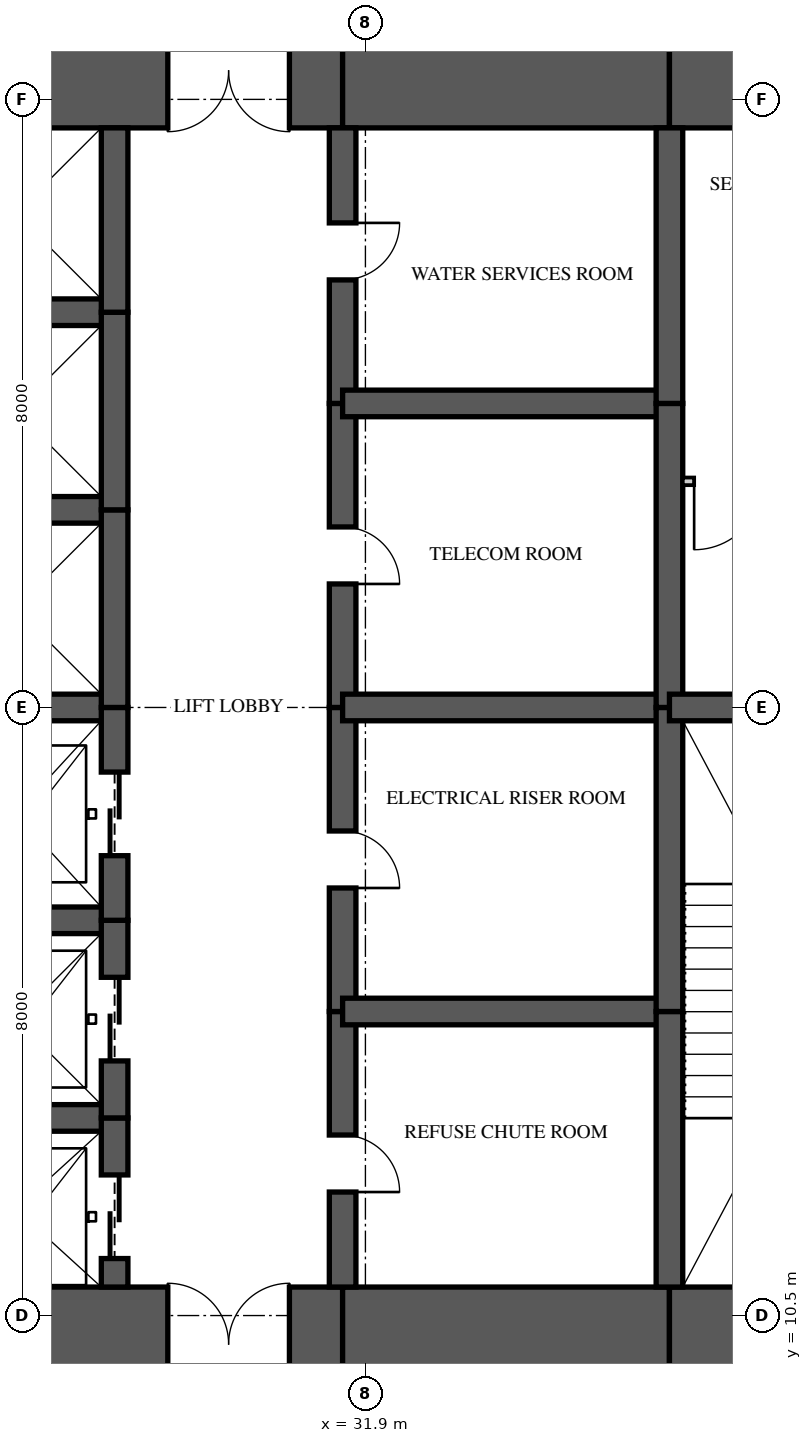
"""IFC4 building model, lengths in metres.
Left out: names, types, materials, properties, quantities, classifications, styles, units other than length and angle.
Written with IfcOpenShell. Run it as: python <this file> out.ifc"""

import sys

from ifc_helpers import new_model, si_unit, direction, frame, frame_2d, origin, place, context, subcontext, project, spatial, rectangle, extrude, element, fill, save


model = new_model("IFC4")
c1 = context("Model", 3, precision=1e-05, world=origin(), true_north=direction((0.0, 1.0)))
c2 = subcontext(c1, "Body", "Model", "MODEL_VIEW")
j1 = project(units=[si_unit("LENGTHUNIT", "METRE"), si_unit("PLANEANGLEUNIT", "RADIAN")], contexts=[c1])
p1 = place(None, origin())
s1 = spatial("IfcSite", under=j1, at=p1, CompositionType="ELEMENT")
p2 = place(p1, origin())
s2 = spatial("IfcBuilding", under=s1, at=p2, CompositionType="ELEMENT")
p3 = place(p2, frame((0.0, 0.0, 114.9)))
s3 = spatial("IfcBuildingStorey", under=s2, at=p3, CompositionType="ELEMENT", Elevation=114.9)
p4 = place(p3, frame((26.0, 10.125, 0.0), z_axis=(0.0, 0.0, 1.0), x_axis=(1.0, 0.0, 0.0)))
e1 = element("IfcWall", 1, at=p4, inside=s3, PredefinedType="SHEAR", context=c2, shape_type="SweptSolid", body=[
    extrude(rectangle(XDim=5.6, YDim=1.5, at=frame_2d((2.8, 0.0))), origin(), (0.0, 0.0, 1.0), 3.35),
])
p5 = place(p4, frame((3.3, 0.0, 0.0)))
e2 = element("IfcOpeningElement", 2, at=p5, cuts=e1, PredefinedType="OPENING", context=c2, shape_type="SweptSolid", body=[
    extrude(rectangle(XDim=1.6, YDim=2.1, at=frame_2d((0.8, 1.05))), frame((0.0, 0.76, 0.0), z_axis=(0.0, -1.0, 0.0), x_axis=(1.0, 0.0, 0.0)), (0.0, 0.0, 1.0), 1.52),
])
p6 = place(p3, frame((31.6, 10.125, 0.0), z_axis=(0.0, 0.0, 1.0), x_axis=(1.0, 0.0, 0.0)))
e3 = element("IfcWall", 3, at=p6, inside=s3, PredefinedType="SHEAR", context=c2, shape_type="SweptSolid", body=[
    extrude(rectangle(XDim=4.3, YDim=1.5, at=frame_2d((2.15, 0.0))), origin(), (0.0, 0.0, 1.0), 3.35),
])
p7 = place(p3, frame((35.9, 10.125, 0.0), z_axis=(0.0, 0.0, 1.0), x_axis=(1.0, 0.0, 0.0)))
e4 = element("IfcWall", 4, at=p7, inside=s3, PredefinedType="SHEAR", context=c2, shape_type="SweptSolid", body=[
    extrude(rectangle(XDim=8.325, YDim=1.5, at=frame_2d((4.163, 0.0))), origin(), (0.0, 0.0, 1.0), 3.35),
])
p8 = place(p7, frame((2.7, 0.0, 0.0)))
e5 = element("IfcOpeningElement", 5, at=p8, cuts=e4, PredefinedType="OPENING", context=c2, shape_type="SweptSolid", body=[
    extrude(rectangle(XDim=1.0, YDim=2.1, at=frame_2d((0.5, 1.05))), frame((0.0, 0.76, 0.0), z_axis=(0.0, -1.0, 0.0), x_axis=(1.0, 0.0, 0.0)), (0.0, 0.0, 1.0), 1.52),
])
p9 = place(p3, frame((44.225, 26.875, 0.0), z_axis=(0.0, 0.0, 1.0), x_axis=(-1.0, 0.0, 0.0)))
e6 = element("IfcWall", 6, at=p9, inside=s3, PredefinedType="SHEAR", context=c2, shape_type="SweptSolid", body=[
    extrude(rectangle(XDim=8.325, YDim=1.5, at=frame_2d((4.163, 0.0))), origin(), (0.0, 0.0, 1.0), 3.35),
])
p10 = place(p9, frame((5.725, 0.0, 0.0)))
e7 = element("IfcOpeningElement", 7, at=p10, cuts=e6, PredefinedType="OPENING", context=c2, shape_type="SweptSolid", body=[
    extrude(rectangle(XDim=0.9, YDim=2.1, at=frame_2d((0.45, 1.05))), frame((0.0, 0.76, 0.0), z_axis=(0.0, -1.0, 0.0), x_axis=(1.0, 0.0, 0.0)), (0.0, 0.0, 1.0), 1.52),
])
p11 = place(p3, frame((35.9, 26.875, 0.0), z_axis=(0.0, 0.0, 1.0), x_axis=(-1.0, 0.0, 0.0)))
e8 = element("IfcWall", 8, at=p11, inside=s3, PredefinedType="SHEAR", context=c2, shape_type="SweptSolid", body=[
    extrude(rectangle(XDim=4.3, YDim=1.5, at=frame_2d((2.15, 0.0))), origin(), (0.0, 0.0, 1.0), 3.35),
])
p12 = place(p3, frame((31.6, 26.875, 0.0), z_axis=(0.0, 0.0, 1.0), x_axis=(-1.0, 0.0, 0.0)))
e9 = element("IfcWall", 9, at=p12, inside=s3, PredefinedType="SHEAR", context=c2, shape_type="SweptSolid", body=[
    extrude(rectangle(XDim=5.6, YDim=1.5, at=frame_2d((2.8, 0.0))), origin(), (0.0, 0.0, 1.0), 3.35),
])
p13 = place(p12, frame((0.7, 0.0, 0.0)))
e10 = element("IfcOpeningElement", 10, at=p13, cuts=e9, PredefinedType="OPENING", context=c2, shape_type="SweptSolid", body=[
    extrude(rectangle(XDim=1.6, YDim=2.1, at=frame_2d((0.8, 1.05))), frame((0.0, 0.76, 0.0), z_axis=(0.0, -1.0, 0.0), x_axis=(1.0, 0.0, 0.0)), (0.0, 0.0, 1.0), 1.52),
])
p14 = place(p3, frame((28.6, 10.875, 0.0), z_axis=(0.0, 0.0, 1.0), x_axis=(0.0, 1.0, 0.0)))
e11 = element("IfcWall", 11, at=p14, inside=s3, PredefinedType="SHEAR", context=c2, shape_type="SweptSolid", body=[
    extrude(rectangle(XDim=2.225, YDim=0.35, at=frame_2d((1.113, 0.0))), origin(), (0.0, 0.0, 1.0), 3.35),
])
p15 = place(p14, frame((0.375, 0.0, 0.0)))
e12 = element("IfcOpeningElement", 12, at=p15, cuts=e11, PredefinedType="OPENING", context=c2, shape_type="SweptSolid", body=[
    extrude(rectangle(XDim=1.1, YDim=2.1, at=frame_2d((0.55, 1.05))), frame((0.0, 0.185, 0.0), z_axis=(0.0, -1.0, 0.0), x_axis=(1.0, 0.0, 0.0)), (0.0, 0.0, 1.0), 0.37),
])
p16 = place(p3, frame((28.6, 13.1, 0.0), z_axis=(0.0, 0.0, 1.0), x_axis=(0.0, 1.0, 0.0)))
e13 = element("IfcWall", 13, at=p16, inside=s3, PredefinedType="SHEAR", context=c2, shape_type="SweptSolid", body=[
    extrude(rectangle(XDim=2.6, YDim=0.35, at=frame_2d((1.3, 0.0))), origin(), (0.0, 0.0, 1.0), 3.35),
])
p17 = place(p16, frame((0.75, 0.0, 0.0)))
e14 = element("IfcOpeningElement", 14, at=p17, cuts=e13, PredefinedType="OPENING", context=c2, shape_type="SweptSolid", body=[
    extrude(rectangle(XDim=1.1, YDim=2.1, at=frame_2d((0.55, 1.05))), frame((0.0, 0.185, 0.0), z_axis=(0.0, -1.0, 0.0), x_axis=(1.0, 0.0, 0.0)), (0.0, 0.0, 1.0), 0.37),
])
p18 = place(p3, frame((28.6, 15.7, 0.0), z_axis=(0.0, 0.0, 1.0), x_axis=(0.0, 1.0, 0.0)))
e15 = element("IfcWall", 15, at=p18, inside=s3, PredefinedType="SHEAR", context=c2, shape_type="SweptSolid", body=[
    extrude(rectangle(XDim=2.8, YDim=0.35, at=frame_2d((1.4, 0.0))), origin(), (0.0, 0.0, 1.0), 3.35),
])
p19 = place(p18, frame((0.85, 0.0, 0.0)))
e16 = element("IfcOpeningElement", 16, at=p19, cuts=e15, PredefinedType="OPENING", context=c2, shape_type="SweptSolid", body=[
    extrude(rectangle(XDim=1.1, YDim=2.1, at=frame_2d((0.55, 1.05))), frame((0.0, 0.185, 0.0), z_axis=(0.0, -1.0, 0.0), x_axis=(1.0, 0.0, 0.0)), (0.0, 0.0, 1.0), 0.37),
])
p20 = place(p3, frame((28.6, 18.5, 0.0), z_axis=(0.0, 0.0, 1.0), x_axis=(0.0, 1.0, 0.0)))
e17 = element("IfcWall", 17, at=p20, inside=s3, PredefinedType="SHEAR", context=c2, shape_type="SweptSolid", body=[
    extrude(rectangle(XDim=2.6, YDim=0.35, at=frame_2d((1.3, 0.0))), origin(), (0.0, 0.0, 1.0), 3.35),
])
p21 = place(p3, frame((28.6, 21.1, 0.0), z_axis=(0.0, 0.0, 1.0), x_axis=(0.0, 1.0, 0.0)))
e18 = element("IfcWall", 18, at=p21, inside=s3, PredefinedType="SHEAR", context=c2, shape_type="SweptSolid", body=[
    extrude(rectangle(XDim=2.6, YDim=0.35, at=frame_2d((1.3, 0.0))), origin(), (0.0, 0.0, 1.0), 3.35),
])
p22 = place(p3, frame((28.6, 23.7, 0.0), z_axis=(0.0, 0.0, 1.0), x_axis=(0.0, 1.0, 0.0)))
e19 = element("IfcWall", 19, at=p22, inside=s3, PredefinedType="SHEAR", context=c2, shape_type="SweptSolid", body=[
    extrude(rectangle(XDim=2.425, YDim=0.35, at=frame_2d((1.212, 0.0))), origin(), (0.0, 0.0, 1.0), 3.35),
])
p23 = place(p3, frame((31.6, 10.875, 0.0), z_axis=(0.0, 0.0, 1.0), x_axis=(0.0, 1.0, 0.0)))
e20 = element("IfcWall", 20, at=p23, inside=s3, PredefinedType="SHEAR", context=c2, shape_type="SweptSolid", body=[
    extrude(rectangle(XDim=3.625, YDim=0.35, at=frame_2d((1.812, 0.0))), origin(), (0.0, 0.0, 1.0), 3.35),
])
p24 = place(p23, frame((1.25, 0.0, 0.0)))
e21 = element("IfcOpeningElement", 21, at=p24, cuts=e20, PredefinedType="OPENING", context=c2, shape_type="SweptSolid", body=[
    extrude(rectangle(XDim=0.75, YDim=2.1, at=frame_2d((0.375, 1.05))), frame((0.0, 0.185, 0.0), z_axis=(0.0, -1.0, 0.0), x_axis=(1.0, 0.0, 0.0)), (0.0, 0.0, 1.0), 0.37),
])
p25 = place(p3, frame((31.6, 14.5, 0.0), z_axis=(0.0, 0.0, 1.0), x_axis=(0.0, 1.0, 0.0)))
e22 = element("IfcWall", 22, at=p25, inside=s3, PredefinedType="SHEAR", context=c2, shape_type="SweptSolid", body=[
    extrude(rectangle(XDim=4.0, YDim=0.35, at=frame_2d((2.0, 0.0))), origin(), (0.0, 0.0, 1.0), 3.35),
])
p26 = place(p25, frame((1.625, 0.0, 0.0)))
e23 = element("IfcOpeningElement", 23, at=p26, cuts=e22, PredefinedType="OPENING", context=c2, shape_type="SweptSolid", body=[
    extrude(rectangle(XDim=0.75, YDim=2.1, at=frame_2d((0.375, 1.05))), frame((0.0, 0.185, 0.0), z_axis=(0.0, -1.0, 0.0), x_axis=(1.0, 0.0, 0.0)), (0.0, 0.0, 1.0), 0.37),
])
p27 = place(p3, frame((31.6, 18.5, 0.0), z_axis=(0.0, 0.0, 1.0), x_axis=(0.0, 1.0, 0.0)))
e24 = element("IfcWall", 24, at=p27, inside=s3, PredefinedType="SHEAR", context=c2, shape_type="SweptSolid", body=[
    extrude(rectangle(XDim=4.0, YDim=0.35, at=frame_2d((2.0, 0.0))), origin(), (0.0, 0.0, 1.0), 3.35),
])
p28 = place(p27, frame((1.625, 0.0, 0.0)))
e25 = element("IfcOpeningElement", 25, at=p28, cuts=e24, PredefinedType="OPENING", context=c2, shape_type="SweptSolid", body=[
    extrude(rectangle(XDim=0.75, YDim=2.1, at=frame_2d((0.375, 1.05))), frame((0.0, 0.185, 0.0), z_axis=(0.0, -1.0, 0.0), x_axis=(1.0, 0.0, 0.0)), (0.0, 0.0, 1.0), 0.37),
])
p29 = place(p3, frame((31.6, 22.5, 0.0), z_axis=(0.0, 0.0, 1.0), x_axis=(0.0, 1.0, 0.0)))
e26 = element("IfcWall", 26, at=p29, inside=s3, PredefinedType="SHEAR", context=c2, shape_type="SweptSolid", body=[
    extrude(rectangle(XDim=3.625, YDim=0.35, at=frame_2d((1.812, 0.0))), origin(), (0.0, 0.0, 1.0), 3.35),
])
p30 = place(p29, frame((1.625, 0.0, 0.0)))
e27 = element("IfcOpeningElement", 27, at=p30, cuts=e26, PredefinedType="OPENING", context=c2, shape_type="SweptSolid", body=[
    extrude(rectangle(XDim=0.75, YDim=2.1, at=frame_2d((0.375, 1.05))), frame((0.0, 0.185, 0.0), z_axis=(0.0, -1.0, 0.0), x_axis=(1.0, 0.0, 0.0)), (0.0, 0.0, 1.0), 0.37),
])
p31 = place(p3, frame((35.9, 10.875, 0.0), z_axis=(0.0, 0.0, 1.0), x_axis=(0.0, 1.0, 0.0)))
e28 = element("IfcWall", 28, at=p31, inside=s3, PredefinedType="SHEAR", context=c2, shape_type="SweptSolid", body=[
    extrude(rectangle(XDim=3.625, YDim=0.35, at=frame_2d((1.812, 0.0))), origin(), (0.0, 0.0, 1.0), 3.35),
])
for number, where, z_axis, x_axis in (
    (29, (35.9, 14.5, 0.0), (0.0, 0.0, 1.0), (0.0, 1.0, 0.0)),
    (30, (35.9, 18.5, 0.0), (0.0, 0.0, 1.0), (0.0, 1.0, 0.0)),
):
    element("IfcWall", number, at=place(p3, frame(where, z_axis=z_axis, x_axis=x_axis)), inside=s3, PredefinedType="SHEAR", context=c2, shape_type="SweptSolid", body=[
        extrude(rectangle(XDim=4.0, YDim=0.35, at=frame_2d((2.0, 0.0))), origin(), (0.0, 0.0, 1.0), 3.35),
    ])
p32 = place(p3, frame((35.9, 22.5, 0.0), z_axis=(0.0, 0.0, 1.0), x_axis=(0.0, 1.0, 0.0)))
e31 = element("IfcWall", 31, at=p32, inside=s3, PredefinedType="SHEAR", context=c2, shape_type="SweptSolid", body=[
    extrude(rectangle(XDim=3.625, YDim=0.35, at=frame_2d((1.812, 0.0))), origin(), (0.0, 0.0, 1.0), 3.35),
])
for number, where, z_axis, x_axis in (
    (32, (26.0, 13.1, 0.0), (0.0, 0.0, 1.0), (1.0, 0.0, 0.0)),
    (33, (26.0, 15.7, 0.0), (0.0, 0.0, 1.0), (1.0, 0.0, 0.0)),
    (34, (26.0, 18.5, 0.0), (0.0, 0.0, 1.0), (1.0, 0.0, 0.0)),
    (35, (26.0, 21.1, 0.0), (0.0, 0.0, 1.0), (1.0, 0.0, 0.0)),
    (36, (26.0, 23.7, 0.0), (0.0, 0.0, 1.0), (1.0, 0.0, 0.0)),
):
    element("IfcWall", number, at=place(p3, frame(where, z_axis=z_axis, x_axis=x_axis)), inside=s3, PredefinedType="SHEAR", context=c2, shape_type="SweptSolid", body=[
        extrude(rectangle(XDim=2.6, YDim=0.35, at=frame_2d((1.3, 0.0))), origin(), (0.0, 0.0, 1.0), 3.35),
    ])
for number, where, z_axis, x_axis in (
    (37, (31.6, 14.5, 0.0), (0.0, 0.0, 1.0), (1.0, 0.0, 0.0)),
    (38, (31.6, 18.5, 0.0), (0.0, 0.0, 1.0), (1.0, 0.0, 0.0)),
    (39, (31.6, 22.5, 0.0), (0.0, 0.0, 1.0), (1.0, 0.0, 0.0)),
):
    element("IfcWall", number, at=place(p3, frame(where, z_axis=z_axis, x_axis=x_axis)), inside=s3, PredefinedType="SHEAR", context=c2, shape_type="SweptSolid", body=[
        extrude(rectangle(XDim=4.3, YDim=0.35, at=frame_2d((2.15, 0.0))), origin(), (0.0, 0.0, 1.0), 3.35),
    ])
p33 = place(p3, frame((35.9, 18.5, 0.0), z_axis=(0.0, 0.0, 1.0), x_axis=(1.0, 0.0, 0.0)))
e40 = element("IfcWall", 40, at=p33, inside=s3, PredefinedType="SHEAR", context=c2, shape_type="SweptSolid", body=[
    extrude(rectangle(XDim=4.3, YDim=0.35, at=frame_2d((2.15, 0.0))), origin(), (0.0, 0.0, 1.0), 3.35),
])
p34 = place(p3, frame((36.075, 21.475, 0.0), z_axis=(0.0, 0.0, 1.0), x_axis=(1.0, 0.0, 0.0)))
e41 = element("IfcWall", 41, at=p34, inside=s3, PredefinedType="PARTITIONING", context=c2, shape_type="SweptSolid", body=[
    extrude(rectangle(XDim=3.95, YDim=0.1, at=frame_2d((1.975, 0.0))), origin(), (0.0, 0.0, 1.0), 3.11),
])
p35 = place(p34, frame((0.15, 0.0, 0.0)))
e42 = element("IfcOpeningElement", 42, at=p35, cuts=e41, PredefinedType="OPENING", context=c2, shape_type="SweptSolid", body=[
    extrude(rectangle(XDim=0.9, YDim=2.1, at=frame_2d((0.45, 1.05))), frame((0.0, 0.06, 0.0), z_axis=(0.0, -1.0, 0.0), x_axis=(1.0, 0.0, 0.0)), (0.0, 0.0, 1.0), 0.12),
])
p36 = place(p35, frame((0.9, 0.0, 0.0), z_axis=(0.0, 0.0, 1.0), x_axis=(-1.0, 0.0, 0.0)))
e43 = element("IfcDoor", 43, at=p36, inside=s3, OperationType="SINGLE_SWING_RIGHT", PredefinedType="DOOR", context=c2, shape_type="SweptSolid", body=[
    extrude(rectangle(XDim=0.9, YDim=2.1, at=frame_2d((0.45, 1.05))), frame((0.0, 0.025, 0.0), z_axis=(0.0, -1.0, 0.0), x_axis=(1.0, 0.0, 0.0)), (0.0, 0.0, 1.0), 0.05),
])
fill(e42, e43)
p37 = place(p15, origin())
e44 = element("IfcDoor", 44, at=p37, inside=s3, OperationType="SLIDING_TO_LEFT", PredefinedType="DOOR", context=c2, shape_type="SweptSolid", body=[
    extrude(rectangle(XDim=1.1, YDim=2.1, at=frame_2d((0.55, 1.05))), frame((0.0, 0.025, 0.0), z_axis=(0.0, -1.0, 0.0), x_axis=(1.0, 0.0, 0.0)), (0.0, 0.0, 1.0), 0.05),
])
fill(e12, e44)
p38 = place(p17, origin())
e45 = element("IfcDoor", 45, at=p38, inside=s3, OperationType="SLIDING_TO_LEFT", PredefinedType="DOOR", context=c2, shape_type="SweptSolid", body=[
    extrude(rectangle(XDim=1.1, YDim=2.1, at=frame_2d((0.55, 1.05))), frame((0.0, 0.025, 0.0), z_axis=(0.0, -1.0, 0.0), x_axis=(1.0, 0.0, 0.0)), (0.0, 0.0, 1.0), 0.05),
])
fill(e14, e45)
p39 = place(p19, origin())
e46 = element("IfcDoor", 46, at=p39, inside=s3, OperationType="SLIDING_TO_LEFT", PredefinedType="DOOR", context=c2, shape_type="SweptSolid", body=[
    extrude(rectangle(XDim=1.1, YDim=2.1, at=frame_2d((0.55, 1.05))), frame((0.0, 0.025, 0.0), z_axis=(0.0, -1.0, 0.0), x_axis=(1.0, 0.0, 0.0)), (0.0, 0.0, 1.0), 0.05),
])
fill(e16, e46)
p40 = place(p5, origin())
e47 = element("IfcDoor", 47, at=p40, inside=s3, OperationType="DOUBLE_DOOR_SINGLE_SWING", PredefinedType="DOOR", context=c2, shape_type="SweptSolid", body=[
    extrude(rectangle(XDim=1.6, YDim=2.1, at=frame_2d((0.8, 1.05))), frame((0.0, 0.025, 0.0), z_axis=(0.0, -1.0, 0.0), x_axis=(1.0, 0.0, 0.0)), (0.0, 0.0, 1.0), 0.05),
])
fill(e2, e47)
p41 = place(p13, origin())
e48 = element("IfcDoor", 48, at=p41, inside=s3, OperationType="DOUBLE_DOOR_SINGLE_SWING", PredefinedType="DOOR", context=c2, shape_type="SweptSolid", body=[
    extrude(rectangle(XDim=1.6, YDim=2.1, at=frame_2d((0.8, 1.05))), frame((0.0, 0.025, 0.0), z_axis=(0.0, -1.0, 0.0), x_axis=(1.0, 0.0, 0.0)), (0.0, 0.0, 1.0), 0.05),
])
fill(e10, e48)
p42 = place(p24, frame((0.75, 0.0, 0.0), z_axis=(0.0, 0.0, 1.0), x_axis=(-1.0, 0.0, 0.0)))
e49 = element("IfcDoor", 49, at=p42, inside=s3, OperationType="SINGLE_SWING_RIGHT", PredefinedType="DOOR", context=c2, shape_type="SweptSolid", body=[
    extrude(rectangle(XDim=0.75, YDim=2.1, at=frame_2d((0.375, 1.05))), frame((0.0, 0.025, 0.0), z_axis=(0.0, -1.0, 0.0), x_axis=(1.0, 0.0, 0.0)), (0.0, 0.0, 1.0), 0.05),
])
fill(e21, e49)
p43 = place(p26, frame((0.75, 0.0, 0.0), z_axis=(0.0, 0.0, 1.0), x_axis=(-1.0, 0.0, 0.0)))
e50 = element("IfcDoor", 50, at=p43, inside=s3, OperationType="SINGLE_SWING_RIGHT", PredefinedType="DOOR", context=c2, shape_type="SweptSolid", body=[
    extrude(rectangle(XDim=0.75, YDim=2.1, at=frame_2d((0.375, 1.05))), frame((0.0, 0.025, 0.0), z_axis=(0.0, -1.0, 0.0), x_axis=(1.0, 0.0, 0.0)), (0.0, 0.0, 1.0), 0.05),
])
fill(e23, e50)
p44 = place(p28, frame((0.75, 0.0, 0.0), z_axis=(0.0, 0.0, 1.0), x_axis=(-1.0, 0.0, 0.0)))
e51 = element("IfcDoor", 51, at=p44, inside=s3, OperationType="SINGLE_SWING_RIGHT", PredefinedType="DOOR", context=c2, shape_type="SweptSolid", body=[
    extrude(rectangle(XDim=0.75, YDim=2.1, at=frame_2d((0.375, 1.05))), frame((0.0, 0.025, 0.0), z_axis=(0.0, -1.0, 0.0), x_axis=(1.0, 0.0, 0.0)), (0.0, 0.0, 1.0), 0.05),
])
fill(e25, e51)
p45 = place(p30, frame((0.75, 0.0, 0.0), z_axis=(0.0, 0.0, 1.0), x_axis=(-1.0, 0.0, 0.0)))
e52 = element("IfcDoor", 52, at=p45, inside=s3, OperationType="SINGLE_SWING_LEFT", PredefinedType="DOOR", context=c2, shape_type="SweptSolid", body=[
    extrude(rectangle(XDim=0.75, YDim=2.1, at=frame_2d((0.375, 1.05))), frame((0.0, 0.025, 0.0), z_axis=(0.0, -1.0, 0.0), x_axis=(1.0, 0.0, 0.0)), (0.0, 0.0, 1.0), 0.05),
])
fill(e27, e52)
save(model, sys.argv[1])
